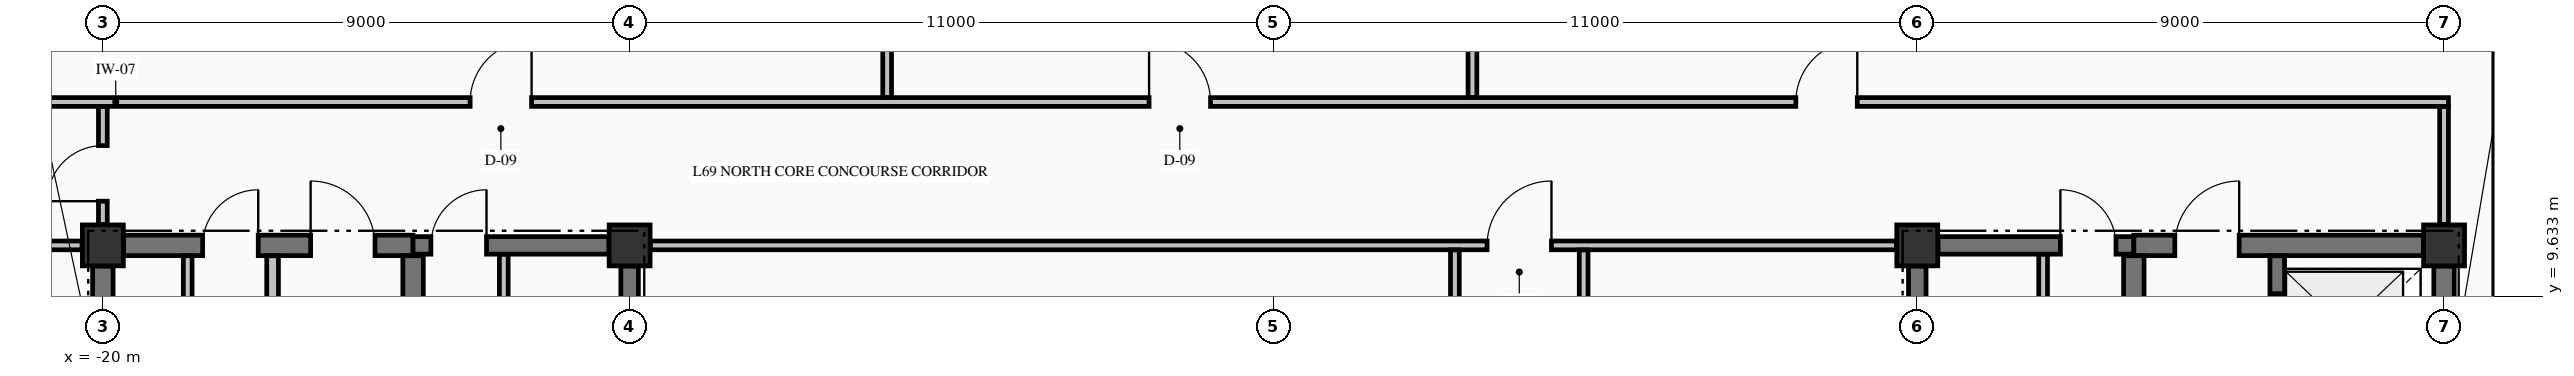
"""IFC4 building model, lengths in metres.
Left out: names, types, materials, properties, quantities, classifications, styles, units other than length and angle.
Written with IfcOpenShell. Run it as: python <this file> out.ifc"""

import sys

from ifc_helpers import new_model, si_unit, direction, frame, frame_2d, origin, origin_2d, place, context, subcontext, project, spatial, rectangle, extrude, element, fill, save


model = new_model("IFC4")
c1 = context("Model", 3, precision=1e-05, world=origin(), true_north=direction((0.0, 1.0)))
c2 = subcontext(c1, "Body", "Model", "MODEL_VIEW")
j1 = project(units=[si_unit("LENGTHUNIT", "METRE"), si_unit("PLANEANGLEUNIT", "RADIAN")], contexts=[c1])
p1 = place(None, origin())
s1 = spatial("IfcSite", under=j1, at=p1, CompositionType="ELEMENT")
p2 = place(p1, origin())
s2 = spatial("IfcBuilding", under=s1, at=p2, CompositionType="ELEMENT")
p3 = place(p2, frame((0.0, 0.0, 260.89)))
s3 = spatial("IfcBuildingStorey", under=s2, at=p3, CompositionType="ELEMENT", Elevation=260.89)
for number, where, z_axis, x_axis in (
    (1, (-20.0, 10.5, -0.25), (0.0, 0.0, 1.0), (1.0, 0.0, 0.0)),
    (2, (-11.0, 10.5, -0.25), (0.0, 0.0, 1.0), (1.0, 0.0, 0.0)),
    (3, (11.0, 10.5, -0.25), (0.0, 0.0, 1.0), (1.0, 0.0, 0.0)),
    (4, (20.0, 10.5, -0.25), (0.0, 0.0, 1.0), (1.0, 0.0, 0.0)),
):
    element("IfcColumn", number, at=place(p3, frame(where, z_axis=z_axis, x_axis=x_axis)), inside=s3, PredefinedType="COLUMN", context=c2, shape_type="SweptSolid", body=[
        extrude(rectangle(XDim=0.7, YDim=0.7, at=origin_2d()), origin(), (0.0, 0.0, 1.0), 3.23),
    ])
p4 = place(p3, frame((21.0, 9.455, 0.0), z_axis=(0.0, 0.0, 1.0), x_axis=(0.0, 1.0, 0.0)))
e5 = element("IfcWall", 5, at=p4, inside=s3, PredefinedType="STANDARD", context=c2, shape_type="SweptSolid", body=[
    extrude(rectangle(XDim=8.09, YDim=0.3, at=frame_2d((4.045, 0.0))), origin(), (0.0, 0.0, 1.0), 2.372),
])
p5 = place(p3, frame((-19.646, 10.5, 0.0), z_axis=(0.0, 0.0, 1.0), x_axis=(1.0, 0.0, 0.0)))
e6 = element("IfcWall", 6, at=p5, inside=s3, PredefinedType="SHEAR", context=c2, shape_type="SweptSolid", body=[
    extrude(rectangle(XDim=4.946, YDim=0.35, at=frame_2d((2.473, 0.0))), origin(), (0.0, 0.0, 1.0), 2.98),
])
p6 = place(p5, frame((3.196, 0.0, 0.0)))
e7 = element("IfcOpeningElement", 7, at=p6, cuts=e6, PredefinedType="OPENING", context=c2, shape_type="SweptSolid", body=[
    extrude(rectangle(XDim=1.1, YDim=2.15, at=frame_2d((0.55, 1.075))), frame((0.0, 0.185, 0.0), z_axis=(0.0, -1.0, 0.0), x_axis=(1.0, 0.0, 0.0)), (0.0, 0.0, 1.0), 0.37),
])
p7 = place(p5, frame((1.351, 0.0, 0.0)))
e8 = element("IfcOpeningElement", 8, at=p7, cuts=e6, PredefinedType="OPENING", context=c2, shape_type="SweptSolid", body=[
    extrude(rectangle(XDim=0.95, YDim=2.15, at=frame_2d((0.475, 1.075))), frame((0.0, 0.185, 0.0), z_axis=(0.0, -1.0, 0.0), x_axis=(1.0, 0.0, 0.0)), (0.0, 0.0, 1.0), 0.37),
])
p8 = place(p3, frame((-14.7, 10.5, 0.0), z_axis=(0.0, 0.0, 1.0), x_axis=(1.0, 0.0, 0.0)))
e9 = element("IfcWall", 9, at=p8, inside=s3, PredefinedType="SHEAR", context=c2, shape_type="SweptSolid", body=[
    extrude(rectangle(XDim=3.346, YDim=0.3, at=frame_2d((1.673, 0.0))), origin(), (0.0, 0.0, 1.0), 2.98),
])
p9 = place(p8, frame((0.305, 0.0, 0.0)))
e10 = element("IfcOpeningElement", 10, at=p9, cuts=e9, PredefinedType="OPENING", context=c2, shape_type="SweptSolid", body=[
    extrude(rectangle(XDim=0.95, YDim=2.15, at=frame_2d((0.475, 1.075))), frame((0.0, 0.16, 0.0), z_axis=(0.0, -1.0, 0.0), x_axis=(1.0, 0.0, 0.0)), (0.0, 0.0, 1.0), 0.32),
])
p10 = place(p3, frame((11.354, 10.5, 0.0), z_axis=(0.0, 0.0, 1.0), x_axis=(1.0, 0.0, 0.0)))
e11 = element("IfcWall", 11, at=p10, inside=s3, PredefinedType="SHEAR", context=c2, shape_type="SweptSolid", body=[
    extrude(rectangle(XDim=3.346, YDim=0.3, at=frame_2d((1.673, 0.0))), origin(), (0.0, 0.0, 1.0), 2.98),
])
p11 = place(p10, frame((2.091, 0.0, 0.0)))
e12 = element("IfcOpeningElement", 12, at=p11, cuts=e11, PredefinedType="OPENING", context=c2, shape_type="SweptSolid", body=[
    extrude(rectangle(XDim=0.95, YDim=2.15, at=frame_2d((0.475, 1.075))), frame((0.0, 0.16, 0.0), z_axis=(0.0, -1.0, 0.0), x_axis=(1.0, 0.0, 0.0)), (0.0, 0.0, 1.0), 0.32),
])
p12 = place(p3, frame((14.7, 10.5, 0.0), z_axis=(0.0, 0.0, 1.0), x_axis=(1.0, 0.0, 0.0)))
e13 = element("IfcWall", 13, at=p12, inside=s3, PredefinedType="SHEAR", context=c2, shape_type="SweptSolid", body=[
    extrude(rectangle(XDim=4.946, YDim=0.35, at=frame_2d((2.473, 0.0))), origin(), (0.0, 0.0, 1.0), 2.98),
])
p13 = place(p12, frame((0.7, 0.0, 0.0)))
e14 = element("IfcOpeningElement", 14, at=p13, cuts=e13, PredefinedType="OPENING", context=c2, shape_type="SweptSolid", body=[
    extrude(rectangle(XDim=1.1, YDim=2.15, at=frame_2d((0.55, 1.075))), frame((0.0, 0.185, 0.0), z_axis=(0.0, -1.0, 0.0), x_axis=(1.0, 0.0, 0.0)), (0.0, 0.0, 1.0), 0.37),
])
p14 = place(p3, frame((-25.835, 10.5, 0.0), z_axis=(0.0, 0.0, 1.0), x_axis=(1.0, 0.0, 0.0)))
e15 = element("IfcWall", 15, at=p14, inside=s3, PredefinedType="PARTITIONING", context=c2, shape_type="SweptSolid", body=[
    extrude(rectangle(XDim=5.479, YDim=0.15, at=frame_2d((2.74, 0.0))), origin(), (0.0, 0.0, 1.0), 2.98),
])
p15 = place(p14, frame((2.335, 0.0, 0.0)))
e16 = element("IfcOpeningElement", 16, at=p15, cuts=e15, PredefinedType="OPENING", context=c2, shape_type="SweptSolid", body=[
    extrude(rectangle(XDim=1.0, YDim=2.15, at=frame_2d((0.5, 1.075))), frame((0.0, 0.085, 0.0), z_axis=(0.0, -1.0, 0.0), x_axis=(1.0, 0.0, 0.0)), (0.0, 0.0, 1.0), 0.17),
])
p16 = place(p3, frame((-10.644, 10.5, 0.0), z_axis=(0.0, 0.0, 1.0), x_axis=(1.0, 0.0, 0.0)))
e17 = element("IfcWall", 17, at=p16, inside=s3, PredefinedType="PARTITIONING", context=c2, shape_type="SweptSolid", body=[
    extrude(rectangle(XDim=21.288, YDim=0.15, at=frame_2d((10.644, 0.0))), origin(), (0.0, 0.0, 1.0), 2.98),
])
p17 = place(p16, frame((14.294, 0.0, 0.0)))
e18 = element("IfcOpeningElement", 18, at=p17, cuts=e17, PredefinedType="OPENING", context=c2, shape_type="SweptSolid", body=[
    extrude(rectangle(XDim=1.1, YDim=2.15, at=frame_2d((0.55, 1.075))), frame((0.0, 0.085, 0.0), z_axis=(0.0, -1.0, 0.0), x_axis=(1.0, 0.0, 0.0)), (0.0, 0.0, 1.0), 0.17),
])
p18 = place(p3, frame((-25.835, 12.95, 0.0), z_axis=(0.0, 0.0, 1.0), x_axis=(1.0, 0.0, 0.0)))
e19 = element("IfcWall", 19, at=p18, inside=s3, PredefinedType="PARTITIONING", context=c2, shape_type="SweptSolid", body=[
    extrude(rectangle(XDim=45.91, YDim=0.15, at=frame_2d((22.955, 0.0))), origin(), (0.0, 0.0, 1.0), 2.98),
])
p19 = place(p18, frame((12.11, 0.0, 0.0)))
e20 = element("IfcOpeningElement", 20, at=p19, cuts=e19, PredefinedType="OPENING", context=c2, shape_type="SweptSolid", body=[
    extrude(rectangle(XDim=1.05, YDim=2.15, at=frame_2d((0.525, 1.075))), frame((0.0, 0.085, 0.0), z_axis=(0.0, -1.0, 0.0), x_axis=(1.0, 0.0, 0.0)), (0.0, 0.0, 1.0), 0.17),
])
p20 = place(p18, frame((23.71, 0.0, 0.0)))
e21 = element("IfcOpeningElement", 21, at=p20, cuts=e19, PredefinedType="OPENING", context=c2, shape_type="SweptSolid", body=[
    extrude(rectangle(XDim=1.05, YDim=2.15, at=frame_2d((0.525, 1.075))), frame((0.0, 0.085, 0.0), z_axis=(0.0, -1.0, 0.0), x_axis=(1.0, 0.0, 0.0)), (0.0, 0.0, 1.0), 0.17),
])
p21 = place(p18, frame((34.76, 0.0, 0.0)))
e22 = element("IfcOpeningElement", 22, at=p21, cuts=e19, PredefinedType="OPENING", context=c2, shape_type="SweptSolid", body=[
    extrude(rectangle(XDim=1.05, YDim=2.15, at=frame_2d((0.525, 1.075))), frame((0.0, 0.085, 0.0), z_axis=(0.0, -1.0, 0.0), x_axis=(1.0, 0.0, 0.0)), (0.0, 0.0, 1.0), 0.17),
])
p22 = place(p3, frame((-20.0, 5.327, 0.0), z_axis=(0.0, 0.0, 1.0), x_axis=(0.0, 1.0, 0.0)))
e23 = element("IfcWall", 23, at=p22, inside=s3, PredefinedType="SHEAR", context=c2, shape_type="SweptSolid", body=[
    extrude(rectangle(XDim=4.819, YDim=0.35, at=frame_2d((2.41, 0.0))), origin(), (0.0, 0.0, 1.0), 2.98),
])
p23 = place(p3, frame((-14.7, 5.852, 0.0), z_axis=(0.0, 0.0, 1.0), x_axis=(0.0, 1.0, 0.0)))
e24 = element("IfcWall", 24, at=p23, inside=s3, PredefinedType="SHEAR", context=c2, shape_type="SweptSolid", body=[
    extrude(rectangle(XDim=4.471, YDim=0.35, at=frame_2d((2.235, 0.0))), origin(), (0.0, 0.0, 1.0), 2.98),
])
for number, where, z_axis, x_axis in (
    (25, (-11.0, 5.852, 0.0), (0.0, 0.0, 1.0), (0.0, 1.0, 0.0)),
    (26, (11.0, 5.852, 0.0), (0.0, 0.0, 1.0), (0.0, 1.0, 0.0)),
):
    element("IfcWall", number, at=place(p3, frame(where, z_axis=z_axis, x_axis=x_axis)), inside=s3, PredefinedType="SHEAR", context=c2, shape_type="SweptSolid", body=[
        extrude(rectangle(XDim=4.294, YDim=0.3, at=frame_2d((2.147, 0.0))), origin(), (0.0, 0.0, 1.0), 2.98),
    ])
p24 = place(p3, frame((14.7, 5.852, 0.0), z_axis=(0.0, 0.0, 1.0), x_axis=(0.0, 1.0, 0.0)))
e27 = element("IfcWall", 27, at=p24, inside=s3, PredefinedType="SHEAR", context=c2, shape_type="SweptSolid", body=[
    extrude(rectangle(XDim=4.471, YDim=0.35, at=frame_2d((2.235, 0.0))), origin(), (0.0, 0.0, 1.0), 2.98),
])
p25 = place(p3, frame((17.15, 7.877, 0.0), z_axis=(0.0, 0.0, 1.0), x_axis=(0.0, 1.0, 0.0)))
e28 = element("IfcWall", 28, at=p25, inside=s3, PredefinedType="SOLIDWALL", context=c2, shape_type="SweptSolid", body=[
    extrude(rectangle(XDim=2.446, YDim=0.25, at=frame_2d((1.223, 0.0))), origin(), (0.0, 0.0, 1.0), 2.98),
])
p26 = place(p25, frame((0.698, 0.0, 0.0)))
e29 = element("IfcOpeningElement", 29, at=p26, cuts=e28, PredefinedType="OPENING", context=c2, shape_type="SweptSolid", body=[
    extrude(rectangle(XDim=1.1, YDim=2.2, at=frame_2d((0.55, 1.1))), frame((0.0, 0.135, 0.0), z_axis=(0.0, -1.0, 0.0), x_axis=(1.0, 0.0, 0.0)), (0.0, 0.0, 1.0), 0.27),
])
p27 = place(p3, frame((20.0, 7.877, 0.0), z_axis=(0.0, 0.0, 1.0), x_axis=(0.0, 1.0, 0.0)))
e30 = element("IfcWall", 30, at=p27, inside=s3, PredefinedType="SHEAR", context=c2, shape_type="SweptSolid", body=[
    extrude(rectangle(XDim=2.269, YDim=0.35, at=frame_2d((1.135, 0.0))), origin(), (0.0, 0.0, 1.0), 2.98),
])
p28 = place(p3, frame((-20.0, 10.856, 0.0), z_axis=(0.0, 0.0, 1.0), x_axis=(0.0, 1.0, 0.0)))
e31 = element("IfcWall", 31, at=p28, inside=s3, PredefinedType="PARTITIONING", context=c2, shape_type="SweptSolid", body=[
    extrude(rectangle(XDim=2.016, YDim=0.15, at=frame_2d((1.008, 0.0))), origin(), (0.0, 0.0, 1.0), 2.98),
])
p29 = place(p28, frame((0.399, 0.0, 0.0)))
e32 = element("IfcOpeningElement", 32, at=p29, cuts=e31, PredefinedType="OPENING", context=c2, shape_type="SweptSolid", body=[
    extrude(rectangle(XDim=0.95, YDim=2.15, at=frame_2d((0.475, 1.075))), frame((0.0, 0.085, 0.0), z_axis=(0.0, -1.0, 0.0), x_axis=(1.0, 0.0, 0.0)), (0.0, 0.0, 1.0), 0.17),
])
p30 = place(p3, frame((-18.55, 5.328, 0.0), z_axis=(0.0, 0.0, 1.0), x_axis=(0.0, 1.0, 0.0)))
e33 = element("IfcWall", 33, at=p30, inside=s3, PredefinedType="PARTITIONING", context=c2, shape_type="SweptSolid", body=[
    extrude(rectangle(XDim=4.994, YDim=0.15, at=frame_2d((2.497, 0.0))), origin(), (0.0, 0.0, 1.0), 2.98),
])
p31 = place(p30, frame((2.047, 0.0, 0.0)))
e34 = element("IfcOpeningElement", 34, at=p31, cuts=e33, PredefinedType="OPENING", context=c2, shape_type="SweptSolid", body=[
    extrude(rectangle(XDim=0.95, YDim=2.15, at=frame_2d((0.475, 1.075))), frame((0.0, 0.085, 0.0), z_axis=(0.0, -1.0, 0.0), x_axis=(1.0, 0.0, 0.0)), (0.0, 0.0, 1.0), 0.17),
])
p32 = place(p3, frame((-17.1, 5.328, 0.0), z_axis=(0.0, 0.0, 1.0), x_axis=(0.0, 1.0, 0.0)))
e35 = element("IfcWall", 35, at=p32, inside=s3, PredefinedType="PARTITIONING", context=c2, shape_type="SweptSolid", body=[
    extrude(rectangle(XDim=4.994, YDim=0.2, at=frame_2d((2.497, 0.0))), origin(), (0.0, 0.0, 1.0), 2.98),
])
p33 = place(p3, frame((-13.15, 7.228, 0.0), z_axis=(0.0, 0.0, 1.0), x_axis=(0.0, 1.0, 0.0)))
e36 = element("IfcWall", 36, at=p33, inside=s3, PredefinedType="PARTITIONING", context=c2, shape_type="SweptSolid", body=[
    extrude(rectangle(XDim=3.119, YDim=0.15, at=frame_2d((1.56, 0.0))), origin(), (0.0, 0.0, 1.0), 2.98),
])
p34 = place(p33, frame((1.097, 0.0, 0.0)))
e37 = element("IfcOpeningElement", 37, at=p34, cuts=e36, PredefinedType="OPENING", context=c2, shape_type="SweptSolid", body=[
    extrude(rectangle(XDim=0.95, YDim=2.15, at=frame_2d((0.475, 1.075))), frame((0.0, 0.085, 0.0), z_axis=(0.0, -1.0, 0.0), x_axis=(1.0, 0.0, 0.0)), (0.0, 0.0, 1.0), 0.17),
])
p35 = place(p3, frame((-6.6, 13.028, 0.0), z_axis=(0.0, 0.0, 1.0), x_axis=(0.0, 1.0, 0.0)))
e38 = element("IfcWall", 38, at=p35, inside=s3, PredefinedType="PARTITIONING", context=c2, shape_type="SweptSolid", body=[
    extrude(rectangle(XDim=10.307, YDim=0.15, at=frame_2d((5.153, 0.0))), origin(), (0.0, 0.0, 1.0), 2.98),
])
p36 = place(p3, frame((3.1, 2.978, 0.0), z_axis=(0.0, 0.0, 1.0), x_axis=(0.0, 1.0, 0.0)))
e39 = element("IfcWall", 39, at=p36, inside=s3, PredefinedType="PARTITIONING", context=c2, shape_type="SweptSolid", body=[
    extrude(rectangle(XDim=7.444, YDim=0.15, at=frame_2d((3.722, 0.0))), origin(), (0.0, 0.0, 1.0), 2.98),
])
p37 = place(p3, frame((3.4, 13.028, 0.0), z_axis=(0.0, 0.0, 1.0), x_axis=(0.0, 1.0, 0.0)))
e40 = element("IfcWall", 40, at=p37, inside=s3, PredefinedType="PARTITIONING", context=c2, shape_type="SweptSolid", body=[
    extrude(rectangle(XDim=10.307, YDim=0.15, at=frame_2d((5.153, 0.0))), origin(), (0.0, 0.0, 1.0), 2.98),
])
p38 = place(p3, frame((5.3, 2.978, 0.0), z_axis=(0.0, 0.0, 1.0), x_axis=(0.0, 1.0, 0.0)))
e41 = element("IfcWall", 41, at=p38, inside=s3, PredefinedType="PARTITIONING", context=c2, shape_type="SweptSolid", body=[
    extrude(rectangle(XDim=7.444, YDim=0.15, at=frame_2d((3.722, 0.0))), origin(), (0.0, 0.0, 1.0), 2.98),
])
p39 = place(p3, frame((13.15, 7.228, 0.0), z_axis=(0.0, 0.0, 1.0), x_axis=(0.0, 1.0, 0.0)))
e42 = element("IfcWall", 42, at=p39, inside=s3, PredefinedType="PARTITIONING", context=c2, shape_type="SweptSolid", body=[
    extrude(rectangle(XDim=3.119, YDim=0.15, at=frame_2d((1.56, 0.0))), origin(), (0.0, 0.0, 1.0), 2.98),
])
p40 = place(p39, frame((1.097, 0.0, 0.0)))
e43 = element("IfcOpeningElement", 43, at=p40, cuts=e42, PredefinedType="OPENING", context=c2, shape_type="SweptSolid", body=[
    extrude(rectangle(XDim=0.95, YDim=2.15, at=frame_2d((0.475, 1.075))), frame((0.0, 0.085, 0.0), z_axis=(0.0, -1.0, 0.0), x_axis=(1.0, 0.0, 0.0)), (0.0, 0.0, 1.0), 0.17),
])
p41 = place(p3, frame((20.0, 10.856, 0.0), z_axis=(0.0, 0.0, 1.0), x_axis=(0.0, 1.0, 0.0)))
e44 = element("IfcWall", 44, at=p41, inside=s3, PredefinedType="PARTITIONING", context=c2, shape_type="SweptSolid", body=[
    extrude(rectangle(XDim=2.016, YDim=0.15, at=frame_2d((1.008, 0.0))), origin(), (0.0, 0.0, 1.0), 2.57),
])
p42 = place(p9, origin())
e45 = element("IfcDoor", 45, at=p42, inside=s3, OperationType="SINGLE_SWING_RIGHT", PredefinedType="DOOR", context=c2, shape_type="SweptSolid", body=[
    extrude(rectangle(XDim=0.95, YDim=2.15, at=frame_2d((0.475, 1.075))), frame((0.0, 0.025, 0.0), z_axis=(0.0, -1.0, 0.0), x_axis=(1.0, 0.0, 0.0)), (0.0, 0.0, 1.0), 0.05),
])
fill(e10, e45)
p43 = place(p11, origin())
e46 = element("IfcDoor", 46, at=p43, inside=s3, OperationType="SINGLE_SWING_LEFT", PredefinedType="DOOR", context=c2, shape_type="SweptSolid", body=[
    extrude(rectangle(XDim=0.95, YDim=2.15, at=frame_2d((0.475, 1.075))), frame((0.0, 0.025, 0.0), z_axis=(0.0, -1.0, 0.0), x_axis=(1.0, 0.0, 0.0)), (0.0, 0.0, 1.0), 0.05),
])
fill(e12, e46)
p44 = place(p6, origin())
e47 = element("IfcDoor", 47, at=p44, inside=s3, OperationType="SINGLE_SWING_LEFT", PredefinedType="DOOR", context=c2, shape_type="SweptSolid", body=[
    extrude(rectangle(XDim=1.1, YDim=2.15, at=frame_2d((0.55, 1.075))), frame((0.0, 0.025, 0.0), z_axis=(0.0, -1.0, 0.0), x_axis=(1.0, 0.0, 0.0)), (0.0, 0.0, 1.0), 0.05),
])
fill(e7, e47)
p45 = place(p7, origin())
e48 = element("IfcDoor", 48, at=p45, inside=s3, OperationType="SINGLE_SWING_RIGHT", PredefinedType="DOOR", context=c2, shape_type="SweptSolid", body=[
    extrude(rectangle(XDim=0.95, YDim=2.15, at=frame_2d((0.475, 1.075))), frame((0.0, 0.025, 0.0), z_axis=(0.0, -1.0, 0.0), x_axis=(1.0, 0.0, 0.0)), (0.0, 0.0, 1.0), 0.05),
])
fill(e8, e48)
p46 = place(p26, origin())
e49 = element("IfcDoor", 49, at=p46, inside=s3, OperationType="SLIDING_TO_RIGHT", PredefinedType="DOOR", context=c2, shape_type="SweptSolid", body=[
    extrude(rectangle(XDim=1.1, YDim=2.2, at=frame_2d((0.55, 1.1))), frame((0.0, 0.025, 0.0), z_axis=(0.0, -1.0, 0.0), x_axis=(1.0, 0.0, 0.0)), (0.0, 0.0, 1.0), 0.05),
])
fill(e29, e49)
p47 = place(p13, origin())
e50 = element("IfcDoor", 50, at=p47, inside=s3, OperationType="SINGLE_SWING_RIGHT", PredefinedType="DOOR", context=c2, shape_type="SweptSolid", body=[
    extrude(rectangle(XDim=1.1, YDim=2.15, at=frame_2d((0.55, 1.075))), frame((0.0, 0.025, 0.0), z_axis=(0.0, -1.0, 0.0), x_axis=(1.0, 0.0, 0.0)), (0.0, 0.0, 1.0), 0.05),
])
fill(e14, e50)
p48 = place(p17, origin())
e51 = element("IfcDoor", 51, at=p48, inside=s3, OperationType="SINGLE_SWING_RIGHT", PredefinedType="DOOR", context=c2, shape_type="SweptSolid", body=[
    extrude(rectangle(XDim=1.1, YDim=2.15, at=frame_2d((0.55, 1.075))), frame((0.0, 0.025, 0.0), z_axis=(0.0, -1.0, 0.0), x_axis=(1.0, 0.0, 0.0)), (0.0, 0.0, 1.0), 0.05),
])
fill(e18, e51)
p49 = place(p19, origin())
e52 = element("IfcDoor", 52, at=p49, inside=s3, OperationType="SINGLE_SWING_RIGHT", PredefinedType="DOOR", context=c2, shape_type="SweptSolid", body=[
    extrude(rectangle(XDim=1.05, YDim=2.15, at=frame_2d((0.525, 1.075))), frame((0.0, 0.025, 0.0), z_axis=(0.0, -1.0, 0.0), x_axis=(1.0, 0.0, 0.0)), (0.0, 0.0, 1.0), 0.05),
])
fill(e20, e52)
p50 = place(p20, origin())
e53 = element("IfcDoor", 53, at=p50, inside=s3, OperationType="SINGLE_SWING_LEFT", PredefinedType="DOOR", context=c2, shape_type="SweptSolid", body=[
    extrude(rectangle(XDim=1.05, YDim=2.15, at=frame_2d((0.525, 1.075))), frame((0.0, 0.025, 0.0), z_axis=(0.0, -1.0, 0.0), x_axis=(1.0, 0.0, 0.0)), (0.0, 0.0, 1.0), 0.05),
])
fill(e21, e53)
p51 = place(p21, origin())
e54 = element("IfcDoor", 54, at=p51, inside=s3, OperationType="SINGLE_SWING_RIGHT", PredefinedType="DOOR", context=c2, shape_type="SweptSolid", body=[
    extrude(rectangle(XDim=1.05, YDim=2.15, at=frame_2d((0.525, 1.075))), frame((0.0, 0.025, 0.0), z_axis=(0.0, -1.0, 0.0), x_axis=(1.0, 0.0, 0.0)), (0.0, 0.0, 1.0), 0.05),
])
fill(e22, e54)
p52 = place(p29, origin())
e55 = element("IfcDoor", 55, at=p52, inside=s3, OperationType="SINGLE_SWING_LEFT", PredefinedType="DOOR", context=c2, shape_type="SweptSolid", body=[
    extrude(rectangle(XDim=0.95, YDim=2.15, at=frame_2d((0.475, 1.075))), frame((0.0, 0.025, 0.0), z_axis=(0.0, -1.0, 0.0), x_axis=(1.0, 0.0, 0.0)), (0.0, 0.0, 1.0), 0.05),
])
fill(e32, e55)
save(model, sys.argv[1])
